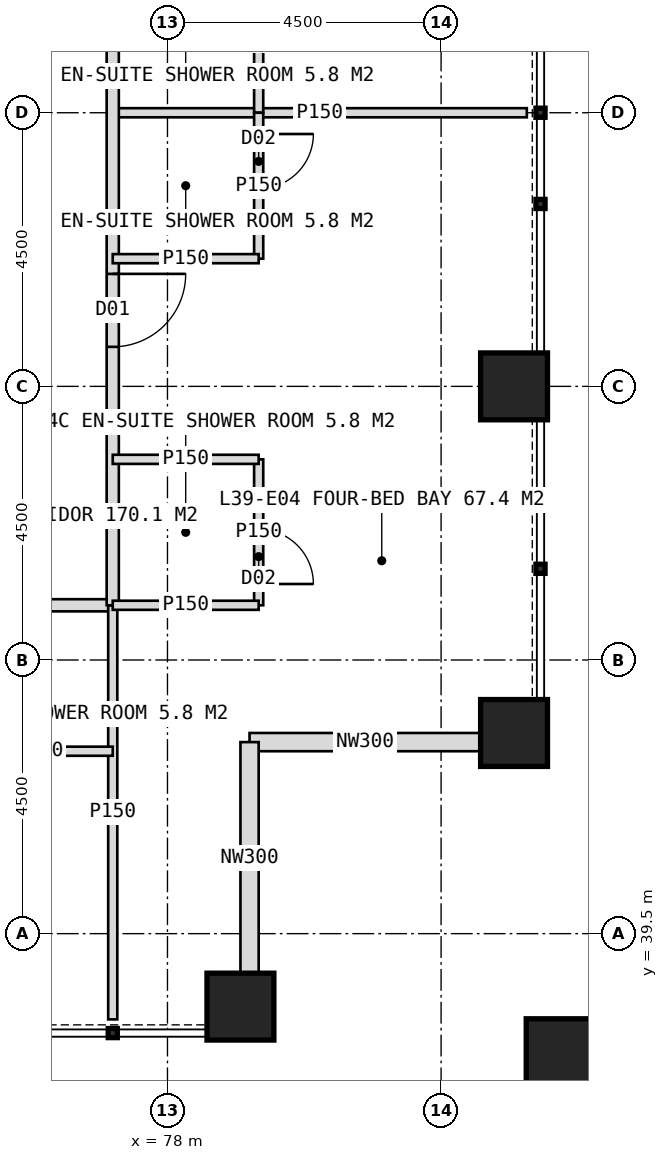
"""IFC4 building model, lengths in metres.
Left out: names, types, materials, properties, quantities, classifications, styles, units other than length and angle.
Written with IfcOpenShell. Run it as: python <this file> out.ifc"""

import sys

from ifc_helpers import new_model, si_unit, direction, frame, frame_2d, origin, origin_2d, place, context, subcontext, project, spatial, rectangle, hollow_rectangle, extrude, element, fill, save


model = new_model("IFC4")
c1 = context("Model", 3, precision=1e-05, world=origin(), true_north=direction((0.0, 1.0)))
c2 = subcontext(c1, "Body", "Model", "MODEL_VIEW")
j1 = project(units=[si_unit("LENGTHUNIT", "METRE"), si_unit("PLANEANGLEUNIT", "RADIAN")], contexts=[c1])
p1 = place(None, origin())
s1 = spatial("IfcSite", under=j1, at=p1, CompositionType="ELEMENT")
p2 = place(p1, origin())
s2 = spatial("IfcBuilding", under=s1, at=p2, CompositionType="ELEMENT")
p3 = place(p2, frame((0.0, 0.0, 164.0)))
s3 = spatial("IfcBuildingStorey", under=s2, at=p3, CompositionType="ELEMENT", Elevation=164.0)
for number, where, z_axis, x_axis in (
    (1, (83.7, 42.8, 0.0), (0.0, 0.0, 1.0), (1.0, 0.0, 0.0)),
    (2, (83.7, 48.5, 0.0), (0.0, 0.0, 1.0), (1.0, 0.0, 0.0)),
    (3, (79.2, 38.3, 0.0), (0.0, 0.0, 1.0), (1.0, 0.0, 0.0)),
):
    element("IfcColumn", number, at=place(p3, frame(where, z_axis=z_axis, x_axis=x_axis)), inside=s3, PredefinedType="COLUMN", context=c2, shape_type="SweptSolid", body=[
        extrude(hollow_rectangle(XDim=1.1, YDim=1.1, WallThickness=0.1, at=origin_2d()), origin(), (0.0, 0.0, 1.0), 4.0),
    ])
p4 = place(p3, frame((84.6, 37.4, 0.0), z_axis=(0.0, 0.0, 1.0), x_axis=(1.0, 0.0, 0.0)))
e4 = element("IfcColumn", 4, at=p4, inside=s3, PredefinedType="COLUMN", context=c2, shape_type="SweptSolid", body=[
    extrude(hollow_rectangle(XDim=1.4, YDim=1.4, WallThickness=0.08, at=origin_2d()), origin(), (0.0, 0.0, 1.0), 4.0),
])
for number, where, z_axis, x_axis in (
    (5, (83.15, 42.65, 0.0), (0.0, 0.0, 1.0), (-1.0, 0.0, 0.0)),
    (6, (79.35, 42.65, 0.0), (0.0, 0.0, 1.0), (0.0, -1.0, 0.0)),
):
    element("IfcWall", number, at=place(p3, frame(where, z_axis=z_axis, x_axis=x_axis)), inside=s3, PredefinedType="ELEMENTEDWALL", context=c2, shape_type="SweptSolid", body=[
        extrude(rectangle(XDim=3.8, YDim=0.3, at=frame_2d((1.9, 0.0))), origin(), (0.0, 0.0, 1.0), 4.0),
    ])
p5 = place(p3, frame((77.1, 44.9, 0.0), z_axis=(0.0, 0.0, 1.0), x_axis=(-1.0, 0.0, 0.0)))
e7 = element("IfcWall", 7, at=p5, inside=s3, PredefinedType="PARTITIONING", context=c2, shape_type="SweptSolid", body=[
    extrude(rectangle(XDim=34.2, YDim=0.2, at=frame_2d((17.1, 0.0))), origin(), (0.0, 0.0, 1.0), 3.75),
])
p6 = place(p5, frame((4.25, 0.0, 0.0)))
e8 = element("IfcOpeningElement", 8, at=p6, cuts=e7, PredefinedType="OPENING", context=c2, shape_type="SweptSolid", body=[
    extrude(rectangle(XDim=1.2, YDim=2.2, at=frame_2d((0.6, 1.1))), frame((0.0, 0.11, 0.0), z_axis=(0.0, -1.0, 0.0), x_axis=(1.0, 0.0, 0.0)), (0.0, 0.0, 1.0), 0.22),
])
p7 = place(p5, frame((10.75, 0.0, 0.0)))
e9 = element("IfcOpeningElement", 9, at=p7, cuts=e7, PredefinedType="OPENING", context=c2, shape_type="SweptSolid", body=[
    extrude(rectangle(XDim=1.2, YDim=2.2, at=frame_2d((0.6, 1.1))), frame((0.0, 0.11, 0.0), z_axis=(0.0, -1.0, 0.0), x_axis=(1.0, 0.0, 0.0)), (0.0, 0.0, 1.0), 0.22),
])
p8 = place(p5, frame((22.25, 0.0, 0.0)))
e10 = element("IfcOpeningElement", 10, at=p8, cuts=e7, PredefinedType="OPENING", context=c2, shape_type="SweptSolid", body=[
    extrude(rectangle(XDim=1.2, YDim=2.2, at=frame_2d((0.6, 1.1))), frame((0.0, 0.11, 0.0), z_axis=(0.0, -1.0, 0.0), x_axis=(1.0, 0.0, 0.0)), (0.0, 0.0, 1.0), 0.22),
])
p9 = place(p5, frame((28.75, 0.0, 0.0)))
e11 = element("IfcOpeningElement", 11, at=p9, cuts=e7, PredefinedType="OPENING", context=c2, shape_type="SweptSolid", body=[
    extrude(rectangle(XDim=1.2, YDim=2.2, at=frame_2d((0.6, 1.1))), frame((0.0, 0.11, 0.0), z_axis=(0.0, -1.0, 0.0), x_axis=(1.0, 0.0, 0.0)), (0.0, 0.0, 1.0), 0.22),
])
p10 = place(p3, frame((77.1, 44.9, 0.0), z_axis=(0.0, 0.0, 1.0), x_axis=(0.0, -1.0, 0.0)))
e12 = element("IfcWall", 12, at=p10, inside=s3, PredefinedType="PARTITIONING", context=c2, shape_type="SweptSolid", body=[
    extrude(rectangle(XDim=6.81, YDim=0.15, at=frame_2d((3.405, 0.0))), origin(), (0.0, 0.0, 1.0), 3.75),
])
p11 = place(p3, frame((77.1, 42.5, 0.0), z_axis=(0.0, 0.0, 1.0), x_axis=(-1.0, 0.0, 0.0)))
e13 = element("IfcWall", 13, at=p11, inside=s3, PredefinedType="PARTITIONING", context=c2, shape_type="SweptSolid", body=[
    extrude(rectangle(XDim=2.4, YDim=0.15, at=frame_2d((1.2, 0.0))), origin(), (0.0, 0.0, 1.0), 3.75),
])
p12 = place(p11, frame((1.15, 0.0, 0.0)))
e14 = element("IfcOpeningElement", 14, at=p12, cuts=e13, PredefinedType="OPENING", context=c2, shape_type="SweptSolid", body=[
    extrude(rectangle(XDim=0.9, YDim=2.1, at=frame_2d((0.45, 1.05))), frame((0.0, 0.085, 0.0), z_axis=(0.0, -1.0, 0.0), x_axis=(1.0, 0.0, 0.0)), (0.0, 0.0, 1.0), 0.17),
])
p13 = place(p3, frame((77.1, 53.0, 0.0), z_axis=(0.0, 0.0, 1.0), x_axis=(1.0, 0.0, 0.0)))
e15 = element("IfcWall", 15, at=p13, inside=s3, PredefinedType="PARTITIONING", context=c2, shape_type="SweptSolid", body=[
    extrude(rectangle(XDim=6.81, YDim=0.15, at=frame_2d((3.405, 0.0))), origin(), (0.0, 0.0, 1.0), 3.75),
])
p14 = place(p3, frame((77.1, 79.1, 0.0), z_axis=(0.0, 0.0, 1.0), x_axis=(0.0, -1.0, 0.0)))
e16 = element("IfcWall", 16, at=p14, inside=s3, PredefinedType="PARTITIONING", context=c2, shape_type="SweptSolid", body=[
    extrude(rectangle(XDim=34.2, YDim=0.2, at=frame_2d((17.1, 0.0))), origin(), (0.0, 0.0, 1.0), 3.75),
])
p15 = place(p14, frame((3.65, 0.0, 0.0)))
e17 = element("IfcOpeningElement", 17, at=p15, cuts=e16, PredefinedType="OPENING", context=c2, shape_type="SweptSolid", body=[
    extrude(rectangle(XDim=1.2, YDim=2.2, at=frame_2d((0.6, 1.1))), frame((0.0, 0.11, 0.0), z_axis=(0.0, -1.0, 0.0), x_axis=(1.0, 0.0, 0.0)), (0.0, 0.0, 1.0), 0.22),
])
p16 = place(p14, frame((10.75, 0.0, 0.0)))
e18 = element("IfcOpeningElement", 18, at=p16, cuts=e16, PredefinedType="OPENING", context=c2, shape_type="SweptSolid", body=[
    extrude(rectangle(XDim=1.2, YDim=2.2, at=frame_2d((0.6, 1.1))), frame((0.0, 0.11, 0.0), z_axis=(0.0, -1.0, 0.0), x_axis=(1.0, 0.0, 0.0)), (0.0, 0.0, 1.0), 0.22),
])
p17 = place(p14, frame((22.25, 0.0, 0.0)))
e19 = element("IfcOpeningElement", 19, at=p17, cuts=e16, PredefinedType="OPENING", context=c2, shape_type="SweptSolid", body=[
    extrude(rectangle(XDim=1.2, YDim=2.2, at=frame_2d((0.6, 1.1))), frame((0.0, 0.11, 0.0), z_axis=(0.0, -1.0, 0.0), x_axis=(1.0, 0.0, 0.0)), (0.0, 0.0, 1.0), 0.22),
])
p18 = place(p14, frame((28.75, 0.0, 0.0)))
e20 = element("IfcOpeningElement", 20, at=p18, cuts=e16, PredefinedType="OPENING", context=c2, shape_type="SweptSolid", body=[
    extrude(rectangle(XDim=1.2, YDim=2.2, at=frame_2d((0.6, 1.1))), frame((0.0, 0.11, 0.0), z_axis=(0.0, -1.0, 0.0), x_axis=(1.0, 0.0, 0.0)), (0.0, 0.0, 1.0), 0.22),
])
p19 = place(p3, frame((79.5, 55.4, 0.0), z_axis=(0.0, 0.0, 1.0), x_axis=(0.0, -1.0, 0.0)))
e21 = element("IfcWall", 21, at=p19, inside=s3, PredefinedType="PARTITIONING", context=c2, shape_type="SweptSolid", body=[
    extrude(rectangle(XDim=2.4, YDim=0.15, at=frame_2d((1.2, 0.0))), origin(), (0.0, 0.0, 1.0), 3.75),
])
p20 = place(p19, frame((0.35, 0.0, 0.0)))
e22 = element("IfcOpeningElement", 22, at=p20, cuts=e21, PredefinedType="OPENING", context=c2, shape_type="SweptSolid", body=[
    extrude(rectangle(XDim=0.9, YDim=2.1, at=frame_2d((0.45, 1.05))), frame((0.0, 0.085, 0.0), z_axis=(0.0, -1.0, 0.0), x_axis=(1.0, 0.0, 0.0)), (0.0, 0.0, 1.0), 0.17),
])
p21 = place(p3, frame((79.5, 53.0, 0.0), z_axis=(0.0, 0.0, 1.0), x_axis=(0.0, -1.0, 0.0)))
e23 = element("IfcWall", 23, at=p21, inside=s3, PredefinedType="PARTITIONING", context=c2, shape_type="SweptSolid", body=[
    extrude(rectangle(XDim=2.4, YDim=0.15, at=frame_2d((1.2, 0.0))), origin(), (0.0, 0.0, 1.0), 3.75),
])
p22 = place(p21, frame((0.35, 0.0, 0.0)))
e24 = element("IfcOpeningElement", 24, at=p22, cuts=e23, PredefinedType="OPENING", context=c2, shape_type="SweptSolid", body=[
    extrude(rectangle(XDim=0.9, YDim=2.1, at=frame_2d((0.45, 1.05))), frame((0.0, 0.085, 0.0), z_axis=(0.0, -1.0, 0.0), x_axis=(1.0, 0.0, 0.0)), (0.0, 0.0, 1.0), 0.17),
])
p23 = place(p3, frame((77.1, 50.6, 0.0), z_axis=(0.0, 0.0, 1.0), x_axis=(1.0, 0.0, 0.0)))
e25 = element("IfcWall", 25, at=p23, inside=s3, PredefinedType="PARTITIONING", context=c2, shape_type="SweptSolid", body=[
    extrude(rectangle(XDim=2.4, YDim=0.15, at=frame_2d((1.2, 0.0))), origin(), (0.0, 0.0, 1.0), 3.75),
])
p24 = place(p3, frame((79.5, 47.3, 0.0), z_axis=(0.0, 0.0, 1.0), x_axis=(0.0, -1.0, 0.0)))
e26 = element("IfcWall", 26, at=p24, inside=s3, PredefinedType="PARTITIONING", context=c2, shape_type="SweptSolid", body=[
    extrude(rectangle(XDim=2.4, YDim=0.15, at=frame_2d((1.2, 0.0))), origin(), (0.0, 0.0, 1.0), 3.75),
])
p25 = place(p24, frame((1.15, 0.0, 0.0)))
e27 = element("IfcOpeningElement", 27, at=p25, cuts=e26, PredefinedType="OPENING", context=c2, shape_type="SweptSolid", body=[
    extrude(rectangle(XDim=0.9, YDim=2.1, at=frame_2d((0.45, 1.05))), frame((0.0, 0.085, 0.0), z_axis=(0.0, -1.0, 0.0), x_axis=(1.0, 0.0, 0.0)), (0.0, 0.0, 1.0), 0.17),
])
for number, where, z_axis, x_axis in (
    (28, (77.1, 47.3, 0.0), (0.0, 0.0, 1.0), (1.0, 0.0, 0.0)),
    (29, (77.1, 44.9, 0.0), (0.0, 0.0, 1.0), (1.0, 0.0, 0.0)),
):
    element("IfcWall", number, at=place(p3, frame(where, z_axis=z_axis, x_axis=x_axis)), inside=s3, PredefinedType="PARTITIONING", context=c2, shape_type="SweptSolid", body=[
        extrude(rectangle(XDim=2.4, YDim=0.15, at=frame_2d((1.2, 0.0))), origin(), (0.0, 0.0, 1.0), 3.75),
    ])
p26 = place(p18, origin())
e30 = element("IfcDoor", 30, at=p26, inside=s3, OperationType="SINGLE_SWING_LEFT", PredefinedType="DOOR", context=c2, shape_type="SweptSolid", body=[
    extrude(rectangle(XDim=1.2, YDim=2.2, at=frame_2d((0.6, 1.1))), frame((0.0, 0.025, 0.0), z_axis=(0.0, -1.0, 0.0), x_axis=(1.0, 0.0, 0.0)), (0.0, 0.0, 1.0), 0.05),
])
fill(e20, e30)
p27 = place(p22, origin())
e31 = element("IfcDoor", 31, at=p27, inside=s3, OperationType="SINGLE_SWING_LEFT", PredefinedType="DOOR", context=c2, shape_type="SweptSolid", body=[
    extrude(rectangle(XDim=0.9, YDim=2.1, at=frame_2d((0.45, 1.05))), frame((0.0, 0.025, 0.0), z_axis=(0.0, -1.0, 0.0), x_axis=(1.0, 0.0, 0.0)), (0.0, 0.0, 1.0), 0.05),
])
fill(e24, e31)
p28 = place(p25, origin())
e32 = element("IfcDoor", 32, at=p28, inside=s3, OperationType="SINGLE_SWING_RIGHT", PredefinedType="DOOR", context=c2, shape_type="SweptSolid", body=[
    extrude(rectangle(XDim=0.9, YDim=2.1, at=frame_2d((0.45, 1.05))), frame((0.0, 0.025, 0.0), z_axis=(0.0, -1.0, 0.0), x_axis=(1.0, 0.0, 0.0)), (0.0, 0.0, 1.0), 0.05),
])
fill(e27, e32)
save(model, sys.argv[1])
